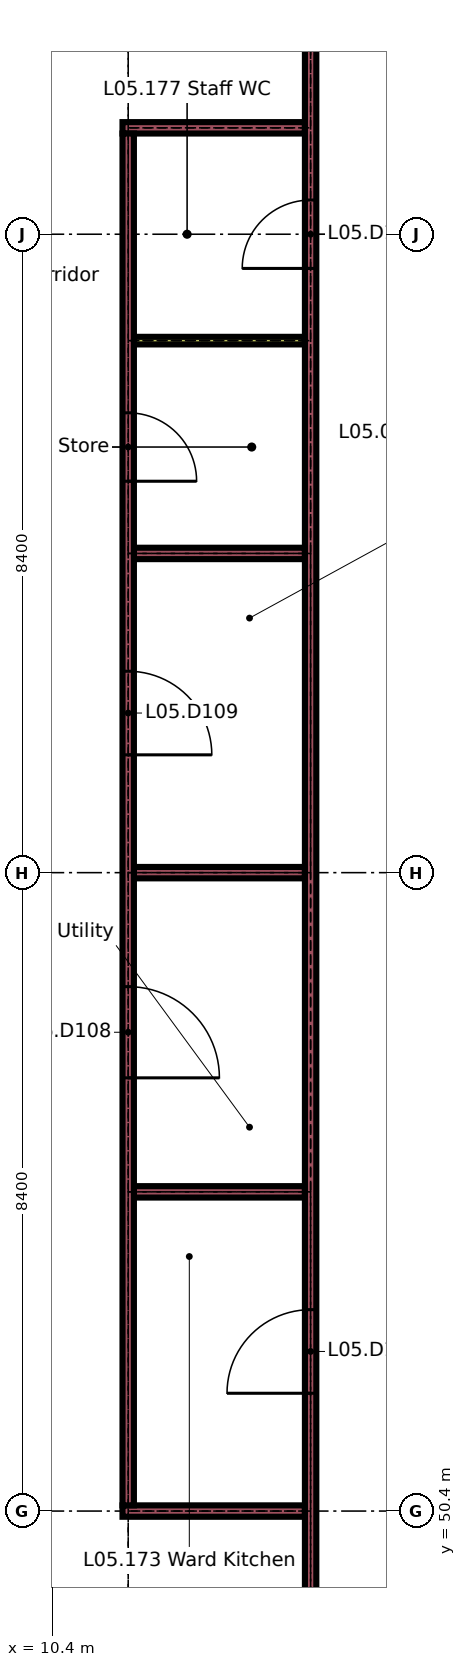
"""IFC4 building model, lengths in metres.
Left out: names, types, materials, properties, quantities, classifications, styles, units other than length and angle.
Written with IfcOpenShell. Run it as: python <this file> out.ifc"""

import sys

from ifc_helpers import new_model, si_unit, direction, frame, frame_2d, origin, place, context, subcontext, project, spatial, rectangle, extrude, element, fill, save


model = new_model("IFC4")
c1 = context("Model", 3, precision=1e-05, world=origin(), true_north=direction((0.0, 1.0)))
c2 = subcontext(c1, "Body", "Model", "MODEL_VIEW")
j1 = project(units=[si_unit("LENGTHUNIT", "METRE"), si_unit("PLANEANGLEUNIT", "RADIAN")], contexts=[c1])
p1 = place(None, origin())
s1 = spatial("IfcSite", under=j1, at=p1, CompositionType="ELEMENT")
p2 = place(p1, origin())
s2 = spatial("IfcBuilding", under=s1, at=p2, CompositionType="ELEMENT")
p3 = place(p2, frame((0.0, 0.0, 22.5)))
s3 = spatial("IfcBuildingStorey", under=s2, at=p3, CompositionType="ELEMENT", Elevation=22.5)
p4 = place(p3, frame((11.325, 50.4, 0.0), z_axis=(0.0, 0.0, 1.0), x_axis=(1.0, 0.0, 0.0)))
e1 = element("IfcWall", 1, at=p4, inside=s3, PredefinedType="PARTITIONING", context=c2, shape_type="SweptSolid", body=[
    extrude(rectangle(XDim=2.4, YDim=0.15, at=frame_2d((1.2, 0.0))), origin(), (0.0, 0.0, 1.0), 3.26),
])
for number, where, z_axis, x_axis in (
    (2, (11.475, 54.6, 0.0), (0.0, 0.0, 1.0), (1.0, 0.0, 0.0)),
    (3, (11.475, 58.8, 0.0), (0.0, 0.0, 1.0), (1.0, 0.0, 0.0)),
    (4, (11.475, 63.0, 0.0), (0.0, 0.0, 1.0), (1.0, 0.0, 0.0)),
):
    element("IfcWall", number, at=place(p3, frame(where, z_axis=z_axis, x_axis=x_axis)), inside=s3, PredefinedType="PARTITIONING", context=c2, shape_type="SweptSolid", body=[
        extrude(rectangle(XDim=2.25, YDim=0.15, at=frame_2d((1.125, 0.0))), origin(), (0.0, 0.0, 1.0), 3.26),
    ])
p5 = place(p3, frame((11.475, 65.8, 0.0), z_axis=(0.0, 0.0, 1.0), x_axis=(1.0, 0.0, 0.0)))
e5 = element("IfcWall", 5, at=p5, inside=s3, PredefinedType="PARTITIONING", context=c2, shape_type="SweptSolid", body=[
    extrude(rectangle(XDim=2.25, YDim=0.1, at=frame_2d((1.125, 0.0))), origin(), (0.0, 0.0, 1.0), 3.26),
])
p6 = place(p3, frame((11.325, 68.6, 0.0), z_axis=(0.0, 0.0, 1.0), x_axis=(1.0, 0.0, 0.0)))
e6 = element("IfcWall", 6, at=p6, inside=s3, PredefinedType="PARTITIONING", context=c2, shape_type="SweptSolid", body=[
    extrude(rectangle(XDim=2.4, YDim=0.15, at=frame_2d((1.2, 0.0))), origin(), (0.0, 0.0, 1.0), 3.26),
])
p7 = place(p3, frame((11.4, 50.475, 0.0), z_axis=(0.0, 0.0, 1.0), x_axis=(0.0, 1.0, 0.0)))
e7 = element("IfcWall", 7, at=p7, inside=s3, PredefinedType="PARTITIONING", context=c2, shape_type="SweptSolid", body=[
    extrude(rectangle(XDim=18.05, YDim=0.15, at=frame_2d((9.025, 0.0))), origin(), (0.0, 0.0, 1.0), 3.26),
])
p8 = place(p7, frame((5.625, 0.0, 0.0)))
e8 = element("IfcOpeningElement", 8, at=p8, cuts=e7, PredefinedType="OPENING", context=c2, shape_type="SweptSolid", body=[
    extrude(rectangle(XDim=1.2, YDim=2.1, at=frame_2d((0.6, 1.05))), frame((0.0, 0.085, 0.0), z_axis=(0.0, -1.0, 0.0), x_axis=(1.0, 0.0, 0.0)), (0.0, 0.0, 1.0), 0.17),
])
p9 = place(p7, frame((9.875, 0.0, 0.0)))
e9 = element("IfcOpeningElement", 9, at=p9, cuts=e7, PredefinedType="OPENING", context=c2, shape_type="SweptSolid", body=[
    extrude(rectangle(XDim=1.1, YDim=2.1, at=frame_2d((0.55, 1.05))), frame((0.0, 0.085, 0.0), z_axis=(0.0, -1.0, 0.0), x_axis=(1.0, 0.0, 0.0)), (0.0, 0.0, 1.0), 0.17),
])
p10 = place(p7, frame((13.475, 0.0, 0.0)))
e10 = element("IfcOpeningElement", 10, at=p10, cuts=e7, PredefinedType="OPENING", context=c2, shape_type="SweptSolid", body=[
    extrude(rectangle(XDim=0.9, YDim=2.1, at=frame_2d((0.45, 1.05))), frame((0.0, 0.085, 0.0), z_axis=(0.0, -1.0, 0.0), x_axis=(1.0, 0.0, 0.0)), (0.0, 0.0, 1.0), 0.17),
])
p11 = place(p3, frame((13.8, 42.1, 0.0), z_axis=(0.0, 0.0, 1.0), x_axis=(0.0, 1.0, 0.0)))
e11 = element("IfcWall", 11, at=p11, inside=s3, PredefinedType="PARTITIONING", context=c2, shape_type="SweptSolid", body=[
    extrude(rectangle(XDim=41.8, YDim=0.15, at=frame_2d((20.9, 0.0))), origin(), (0.0, 0.0, 1.0), 3.26),
])
p12 = place(p11, frame((9.85, 0.0, 0.0)))
e12 = element("IfcOpeningElement", 12, at=p12, cuts=e11, PredefinedType="OPENING", context=c2, shape_type="SweptSolid", body=[
    extrude(rectangle(XDim=1.1, YDim=2.1, at=frame_2d((0.55, 1.05))), frame((0.0, 0.085, 0.0), z_axis=(0.0, -1.0, 0.0), x_axis=(1.0, 0.0, 0.0)), (0.0, 0.0, 1.0), 0.17),
])
p13 = place(p11, frame((24.65, 0.0, 0.0)))
e13 = element("IfcOpeningElement", 13, at=p13, cuts=e11, PredefinedType="OPENING", context=c2, shape_type="SweptSolid", body=[
    extrude(rectangle(XDim=0.9, YDim=2.1, at=frame_2d((0.45, 1.05))), frame((0.0, 0.085, 0.0), z_axis=(0.0, -1.0, 0.0), x_axis=(1.0, 0.0, 0.0)), (0.0, 0.0, 1.0), 0.17),
])
p14 = place(p11, frame((36.45, 0.0, 0.0)))
e14 = element("IfcOpeningElement", 14, at=p14, cuts=e11, PredefinedType="OPENING", context=c2, shape_type="SweptSolid", body=[
    extrude(rectangle(XDim=1.1, YDim=2.1, at=frame_2d((0.55, 1.05))), frame((0.0, 0.085, 0.0), z_axis=(0.0, -1.0, 0.0), x_axis=(1.0, 0.0, 0.0)), (0.0, 0.0, 1.0), 0.17),
])
p15 = place(p8, origin())
e15 = element("IfcDoor", 15, at=p15, inside=s3, OperationType="SINGLE_SWING_LEFT", PredefinedType="DOOR", context=c2, shape_type="SweptSolid", body=[
    extrude(rectangle(XDim=1.2, YDim=2.1, at=frame_2d((0.6, 1.05))), frame((0.0, 0.025, 0.0), z_axis=(0.0, -1.0, 0.0), x_axis=(1.0, 0.0, 0.0)), (0.0, 0.0, 1.0), 0.05),
])
fill(e8, e15)
p16 = place(p9, origin())
e16 = element("IfcDoor", 16, at=p16, inside=s3, OperationType="SINGLE_SWING_LEFT", PredefinedType="DOOR", context=c2, shape_type="SweptSolid", body=[
    extrude(rectangle(XDim=1.1, YDim=2.1, at=frame_2d((0.55, 1.05))), frame((0.0, 0.025, 0.0), z_axis=(0.0, -1.0, 0.0), x_axis=(1.0, 0.0, 0.0)), (0.0, 0.0, 1.0), 0.05),
])
fill(e9, e16)
p17 = place(p10, origin())
e17 = element("IfcDoor", 17, at=p17, inside=s3, OperationType="SINGLE_SWING_LEFT", PredefinedType="DOOR", context=c2, shape_type="SweptSolid", body=[
    extrude(rectangle(XDim=0.9, YDim=2.1, at=frame_2d((0.45, 1.05))), frame((0.0, 0.02, 0.0), z_axis=(0.0, -1.0, 0.0), x_axis=(1.0, 0.0, 0.0)), (0.0, 0.0, 1.0), 0.04),
])
fill(e10, e17)
p18 = place(p12, origin())
e18 = element("IfcDoor", 18, at=p18, inside=s3, OperationType="SINGLE_SWING_RIGHT", PredefinedType="DOOR", context=c2, shape_type="SweptSolid", body=[
    extrude(rectangle(XDim=1.1, YDim=2.1, at=frame_2d((0.55, 1.05))), frame((0.0, 0.025, 0.0), z_axis=(0.0, -1.0, 0.0), x_axis=(1.0, 0.0, 0.0)), (0.0, 0.0, 1.0), 0.05),
])
fill(e12, e18)
p19 = place(p13, origin())
e19 = element("IfcDoor", 19, at=p19, inside=s3, OperationType="SINGLE_SWING_RIGHT", PredefinedType="DOOR", context=c2, shape_type="SweptSolid", body=[
    extrude(rectangle(XDim=0.9, YDim=2.1, at=frame_2d((0.45, 1.05))), frame((0.0, 0.02, 0.0), z_axis=(0.0, -1.0, 0.0), x_axis=(1.0, 0.0, 0.0)), (0.0, 0.0, 1.0), 0.04),
])
fill(e13, e19)
save(model, sys.argv[1])
